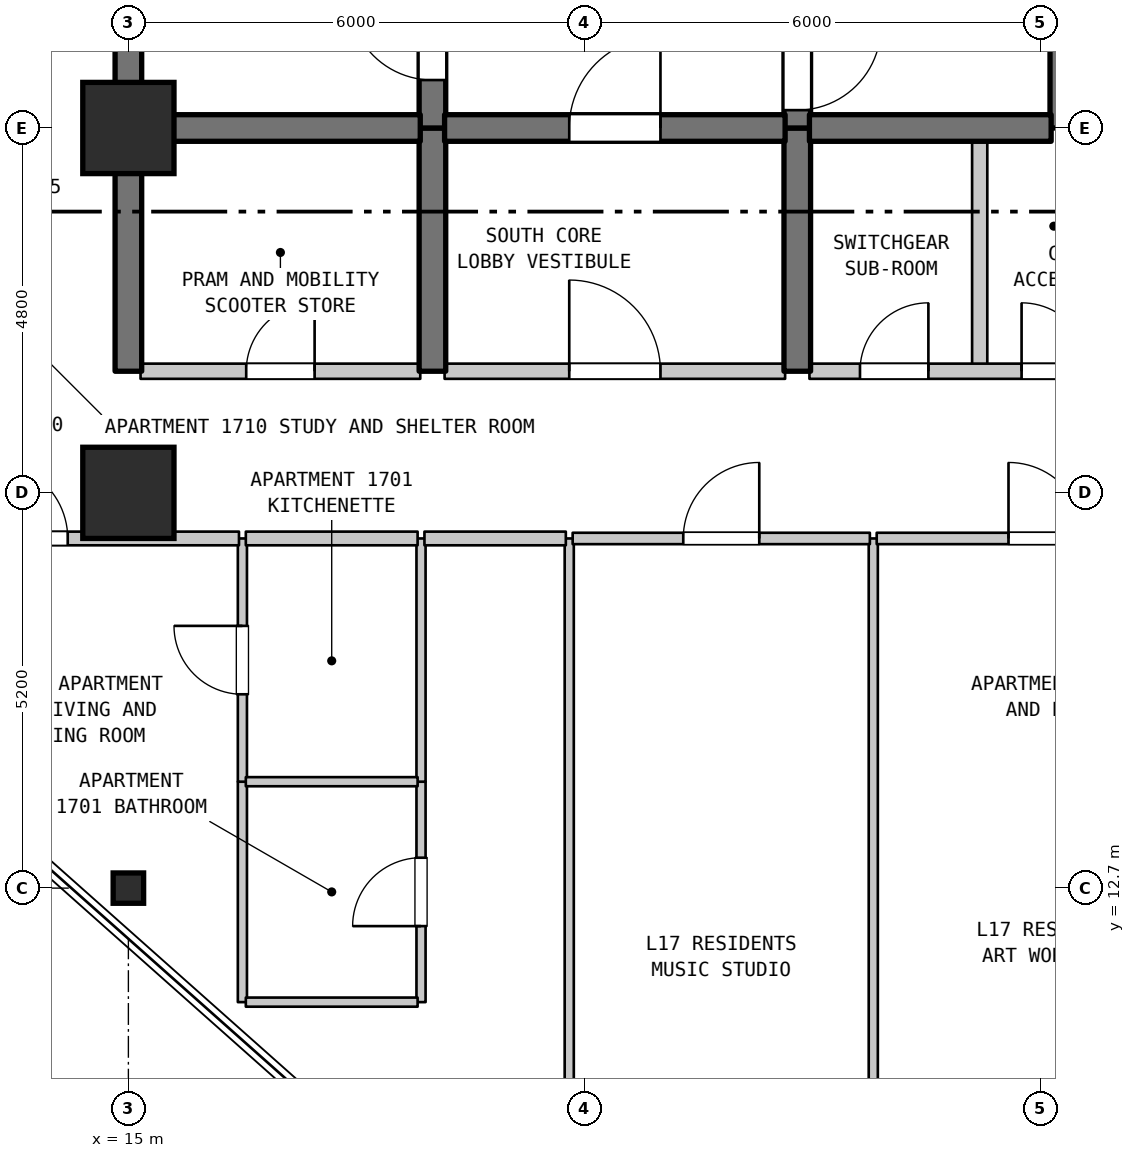
"""IFC4 building model, lengths in metres.
Left out: names, types, materials, properties, quantities, classifications, styles, units other than length and angle.
Written with IfcOpenShell. Run it as: python <this file> out.ifc"""

import sys

from ifc_helpers import new_model, si_unit, direction, frame, frame_2d, origin, origin_2d, place, context, subcontext, project, spatial, rectangle, i_section, extrude, element, fill, save


model = new_model("IFC4")
c1 = context("Model", 3, precision=1e-05, world=origin(), true_north=direction((0.0, 1.0)))
c2 = subcontext(c1, "Body", "Model", "MODEL_VIEW")
j1 = project(units=[si_unit("LENGTHUNIT", "METRE"), si_unit("PLANEANGLEUNIT", "RADIAN")], contexts=[c1])
p1 = place(None, origin())
s1 = spatial("IfcSite", under=j1, at=p1, CompositionType="ELEMENT")
p2 = place(p1, origin())
s2 = spatial("IfcBuilding", under=s1, at=p2, CompositionType="ELEMENT")
p3 = place(p2, frame((0.0, 0.0, 73.8)))
s3 = spatial("IfcBuildingStorey", under=s2, at=p3, CompositionType="ELEMENT", Elevation=73.8)
p4 = place(p3, frame((15.0, 12.7, 0.0), z_axis=(0.0, 0.0, 1.0), x_axis=(1.0, 0.0, 0.0)))
e1 = element("IfcColumn", 1, at=p4, inside=s3, PredefinedType="COLUMN", context=c2, shape_type="SweptSolid", body=[
    extrude(i_section(OverallWidth=0.401, OverallDepth=0.399, WebThickness=0.025, FlangeThickness=0.04, FilletRadius=0.015, at=origin_2d()), origin(), (0.0, 0.0, 1.0), 3.7),
])
for number, where, z_axis, x_axis in (
    (2, (15.0, 17.9, 0.0), (0.0, 0.0, 1.0), (1.0, 0.0, 0.0)),
    (3, (15.0, 22.7, 0.0), (0.0, 0.0, 1.0), (1.0, 0.0, 0.0)),
):
    element("IfcColumn", number, at=place(p3, frame(where, z_axis=z_axis, x_axis=x_axis)), inside=s3, PredefinedType="COLUMN", context=c2, shape_type="SweptSolid", body=[
        extrude(rectangle(XDim=1.2, YDim=1.2, at=origin_2d()), origin(), (0.0, 0.0, 1.0), 3.7),
    ])
p5 = place(p3, frame((15.0, 19.5, 0.0), z_axis=(0.0, 0.0, 1.0), x_axis=(0.0, 1.0, 0.0)))
e4 = element("IfcWall", 4, at=p5, inside=s3, PredefinedType="SHEAR", context=c2, shape_type="SweptSolid", body=[
    extrude(rectangle(XDim=3.2, YDim=0.35, at=frame_2d((1.6, 0.0))), origin(), (0.0, 0.0, 1.0), 3.385),
])
p6 = place(p3, frame((15.0, 22.7, 0.0), z_axis=(0.0, 0.0, 1.0), x_axis=(0.0, 1.0, 0.0)))
e5 = element("IfcWall", 5, at=p6, inside=s3, PredefinedType="SHEAR", context=c2, shape_type="SweptSolid", body=[
    extrude(rectangle(XDim=6.8, YDim=0.35, at=frame_2d((3.4, 0.0))), origin(), (0.0, 0.0, 1.0), 3.385),
])
p7 = place(p3, frame((16.5, 11.2, 0.0), z_axis=(0.0, 0.0, 1.0), x_axis=(0.0, 1.0, 0.0)))
e6 = element("IfcWall", 6, at=p7, inside=s3, PredefinedType="PARTITIONING", context=c2, shape_type="SweptSolid", body=[
    extrude(rectangle(XDim=2.9, YDim=0.12, at=frame_2d((1.45, 0.0))), origin(), (0.0, 0.0, 1.0), 3.385),
])
p8 = place(p3, frame((16.5, 14.1, 0.0), z_axis=(0.0, 0.0, 1.0), x_axis=(0.0, 1.0, 0.0)))
e7 = element("IfcWall", 7, at=p8, inside=s3, PredefinedType="PARTITIONING", context=c2, shape_type="SweptSolid", body=[
    extrude(rectangle(XDim=3.2, YDim=0.12, at=frame_2d((1.6, 0.0))), origin(), (0.0, 0.0, 1.0), 3.385),
])
p9 = place(p8, frame((1.15, 0.0, 0.0)))
e8 = element("IfcOpeningElement", 8, at=p9, cuts=e7, PredefinedType="OPENING", context=c2, shape_type="SweptSolid", body=[
    extrude(rectangle(XDim=0.9, YDim=2.15, at=frame_2d((0.45, 1.075))), frame((0.0, 0.07, 0.0), z_axis=(0.0, -1.0, 0.0), x_axis=(1.0, 0.0, 0.0)), (0.0, 0.0, 1.0), 0.14),
])
p10 = place(p3, frame((18.85, 11.2, 0.0), z_axis=(0.0, 0.0, 1.0), x_axis=(0.0, 1.0, 0.0)))
e9 = element("IfcWall", 9, at=p10, inside=s3, PredefinedType="PARTITIONING", context=c2, shape_type="SweptSolid", body=[
    extrude(rectangle(XDim=2.9, YDim=0.12, at=frame_2d((1.45, 0.0))), origin(), (0.0, 0.0, 1.0), 3.385),
])
p11 = place(p10, frame((1.0, 0.0, 0.0)))
e10 = element("IfcOpeningElement", 10, at=p11, cuts=e9, PredefinedType="OPENING", context=c2, shape_type="SweptSolid", body=[
    extrude(rectangle(XDim=0.9, YDim=2.1, at=frame_2d((0.45, 1.05))), frame((0.0, 0.07, 0.0), z_axis=(0.0, -1.0, 0.0), x_axis=(1.0, 0.0, 0.0)), (0.0, 0.0, 1.0), 0.14),
])
p12 = place(p3, frame((18.85, 14.1, 0.0), z_axis=(0.0, 0.0, 1.0), x_axis=(0.0, 1.0, 0.0)))
e11 = element("IfcWall", 11, at=p12, inside=s3, PredefinedType="PARTITIONING", context=c2, shape_type="SweptSolid", body=[
    extrude(rectangle(XDim=3.2, YDim=0.12, at=frame_2d((1.6, 0.0))), origin(), (0.0, 0.0, 1.0), 3.385),
])
p13 = place(p3, frame((19.0, 19.5, 0.0), z_axis=(0.0, 0.0, 1.0), x_axis=(0.0, 1.0, 0.0)))
e12 = element("IfcWall", 12, at=p13, inside=s3, PredefinedType="SHEAR", context=c2, shape_type="SweptSolid", body=[
    extrude(rectangle(XDim=3.2, YDim=0.35, at=frame_2d((1.6, 0.0))), origin(), (0.0, 0.0, 1.0), 3.385),
])
p14 = place(p3, frame((19.0, 22.7, 0.0), z_axis=(0.0, 0.0, 1.0), x_axis=(0.0, 1.0, 0.0)))
e13 = element("IfcWall", 13, at=p14, inside=s3, PredefinedType="SHEAR", context=c2, shape_type="SweptSolid", body=[
    extrude(rectangle(XDim=5.5, YDim=0.35, at=frame_2d((2.75, 0.0))), origin(), (0.0, 0.0, 1.0), 3.385),
])
p15 = place(p14, frame((0.631, 0.0, 0.0)))
e14 = element("IfcOpeningElement", 14, at=p15, cuts=e13, PredefinedType="OPENING", context=c2, shape_type="SweptSolid", body=[
    extrude(rectangle(XDim=1.1, YDim=2.15, at=frame_2d((0.55, 1.075))), frame((0.0, 0.185, 0.0), z_axis=(0.0, -1.0, 0.0), x_axis=(1.0, 0.0, 0.0)), (0.0, 0.0, 1.0), 0.37),
])
p16 = place(p3, frame((20.8, 6.888, 0.0), z_axis=(0.0, 0.0, 1.0), x_axis=(0.0, 1.0, 0.0)))
e15 = element("IfcWall", 15, at=p16, inside=s3, PredefinedType="PARTITIONING", context=c2, shape_type="SweptSolid", body=[
    extrude(rectangle(XDim=10.412, YDim=0.12, at=frame_2d((5.206, 0.0))), origin(), (0.0, 0.0, 1.0), 3.385),
])
p17 = place(p3, frame((23.8, 19.5, 0.0), z_axis=(0.0, 0.0, 1.0), x_axis=(0.0, 1.0, 0.0)))
e16 = element("IfcWall", 16, at=p17, inside=s3, PredefinedType="SHEAR", context=c2, shape_type="SweptSolid", body=[
    extrude(rectangle(XDim=3.2, YDim=0.35, at=frame_2d((1.6, 0.0))), origin(), (0.0, 0.0, 1.0), 3.385),
])
p18 = place(p3, frame((23.8, 22.7, 0.0), z_axis=(0.0, 0.0, 1.0), x_axis=(0.0, 1.0, 0.0)))
e17 = element("IfcWall", 17, at=p18, inside=s3, PredefinedType="SHEAR", context=c2, shape_type="SweptSolid", body=[
    extrude(rectangle(XDim=5.5, YDim=0.35, at=frame_2d((2.75, 0.0))), origin(), (0.0, 0.0, 1.0), 3.385),
])
p19 = place(p18, frame((0.235, 0.0, 0.0)))
e18 = element("IfcOpeningElement", 18, at=p19, cuts=e17, PredefinedType="OPENING", context=c2, shape_type="SweptSolid", body=[
    extrude(rectangle(XDim=1.1, YDim=2.15, at=frame_2d((0.55, 1.075))), frame((0.0, 0.185, 0.0), z_axis=(0.0, -1.0, 0.0), x_axis=(1.0, 0.0, 0.0)), (0.0, 0.0, 1.0), 0.37),
])
p20 = place(p3, frame((24.8, 0.71, 0.0), z_axis=(0.0, 0.0, 1.0), x_axis=(0.0, 1.0, 0.0)))
e19 = element("IfcWall", 19, at=p20, inside=s3, PredefinedType="PARTITIONING", context=c2, shape_type="SweptSolid", body=[
    extrude(rectangle(XDim=16.59, YDim=0.12, at=frame_2d((8.295, 0.0))), origin(), (0.0, 0.0, 1.0), 3.385),
])
p21 = place(p3, frame((26.2, 19.5, 0.0), z_axis=(0.0, 0.0, 1.0), x_axis=(0.0, 1.0, 0.0)))
e20 = element("IfcWall", 20, at=p21, inside=s3, PredefinedType="STANDARD", context=c2, shape_type="SweptSolid", body=[
    extrude(rectangle(XDim=3.2, YDim=0.2, at=frame_2d((1.6, 0.0))), origin(), (0.0, 0.0, 1.0), 3.385),
])
p22 = place(p3, frame((27.3, 22.7, 0.0), z_axis=(0.0, 0.0, 1.0), x_axis=(0.0, 1.0, 0.0)))
e21 = element("IfcWall", 21, at=p22, inside=s3, PredefinedType="SHEAR", context=c2, shape_type="SweptSolid", body=[
    extrude(rectangle(XDim=2.9, YDim=0.35, at=frame_2d((1.45, 0.0))), origin(), (0.0, 0.0, 1.0), 3.385),
])
for number, where, z_axis, x_axis in (
    (22, (16.545, 11.2, 0.0), (0.0, 0.0, 1.0), (1.0, 0.0, 0.0)),
    (23, (16.545, 14.1, 0.0), (0.0, 0.0, 1.0), (1.0, 0.0, 0.0)),
):
    element("IfcWall", number, at=place(p3, frame(where, z_axis=z_axis, x_axis=x_axis)), inside=s3, PredefinedType="PARTITIONING", context=c2, shape_type="SweptSolid", body=[
        extrude(rectangle(XDim=2.26, YDim=0.12, at=frame_2d((1.13, 0.0))), origin(), (0.0, 0.0, 1.0), 3.385),
    ])
p23 = place(p3, frame((12.875, 17.3, 0.0), z_axis=(0.0, 0.0, 1.0), x_axis=(1.0, 0.0, 0.0)))
e24 = element("IfcWall", 24, at=p23, inside=s3, PredefinedType="STANDARD", context=c2, shape_type="SweptSolid", body=[
    extrude(rectangle(XDim=3.58, YDim=0.18, at=frame_2d((1.79, 0.0))), origin(), (0.0, 0.0, 1.0), 3.385),
])
p24 = place(p23, frame((0.327, 0.0, 0.0)))
e25 = element("IfcOpeningElement", 25, at=p24, cuts=e24, PredefinedType="OPENING", context=c2, shape_type="SweptSolid", body=[
    extrude(rectangle(XDim=1.0, YDim=2.15, at=frame_2d((0.5, 1.075))), frame((0.0, 0.1, 0.0), z_axis=(0.0, -1.0, 0.0), x_axis=(1.0, 0.0, 0.0)), (0.0, 0.0, 1.0), 0.2),
])
p25 = place(p3, frame((16.545, 17.3, 0.0), z_axis=(0.0, 0.0, 1.0), x_axis=(1.0, 0.0, 0.0)))
e26 = element("IfcWall", 26, at=p25, inside=s3, PredefinedType="STANDARD", context=c2, shape_type="SweptSolid", body=[
    extrude(rectangle(XDim=2.26, YDim=0.18, at=frame_2d((1.13, 0.0))), origin(), (0.0, 0.0, 1.0), 3.385),
])
p26 = place(p3, frame((18.895, 17.3, 0.0), z_axis=(0.0, 0.0, 1.0), x_axis=(1.0, 0.0, 0.0)))
e27 = element("IfcWall", 27, at=p26, inside=s3, PredefinedType="STANDARD", context=c2, shape_type="SweptSolid", body=[
    extrude(rectangle(XDim=1.86, YDim=0.18, at=frame_2d((0.93, 0.0))), origin(), (0.0, 0.0, 1.0), 3.385),
])
p27 = place(p3, frame((20.845, 17.3, 0.0), z_axis=(0.0, 0.0, 1.0), x_axis=(1.0, 0.0, 0.0)))
e28 = element("IfcWall", 28, at=p27, inside=s3, PredefinedType="STANDARD", context=c2, shape_type="SweptSolid", body=[
    extrude(rectangle(XDim=3.91, YDim=0.15, at=frame_2d((1.955, 0.0))), origin(), (0.0, 0.0, 1.0), 3.385),
])
p28 = place(p27, frame((1.455, 0.0, 0.0)))
e29 = element("IfcOpeningElement", 29, at=p28, cuts=e28, PredefinedType="OPENING", context=c2, shape_type="SweptSolid", body=[
    extrude(rectangle(XDim=1.0, YDim=2.15, at=frame_2d((0.5, 1.075))), frame((0.0, 0.085, 0.0), z_axis=(0.0, -1.0, 0.0), x_axis=(1.0, 0.0, 0.0)), (0.0, 0.0, 1.0), 0.17),
])
p29 = place(p3, frame((24.845, 17.3, 0.0), z_axis=(0.0, 0.0, 1.0), x_axis=(1.0, 0.0, 0.0)))
e30 = element("IfcWall", 30, at=p29, inside=s3, PredefinedType="STANDARD", context=c2, shape_type="SweptSolid", body=[
    extrude(rectangle(XDim=4.61, YDim=0.15, at=frame_2d((2.305, 0.0))), origin(), (0.0, 0.0, 1.0), 3.385),
])
p30 = place(p29, frame((1.734, 0.0, 0.0)))
e31 = element("IfcOpeningElement", 31, at=p30, cuts=e30, PredefinedType="OPENING", context=c2, shape_type="SweptSolid", body=[
    extrude(rectangle(XDim=1.0, YDim=2.15, at=frame_2d((0.5, 1.075))), frame((0.0, 0.085, 0.0), z_axis=(0.0, -1.0, 0.0), x_axis=(1.0, 0.0, 0.0)), (0.0, 0.0, 1.0), 0.17),
])
p31 = place(p3, frame((15.16, 19.5, 0.0), z_axis=(0.0, 0.0, 1.0), x_axis=(1.0, 0.0, 0.0)))
e32 = element("IfcWall", 32, at=p31, inside=s3, PredefinedType="STANDARD", context=c2, shape_type="SweptSolid", body=[
    extrude(rectangle(XDim=3.68, YDim=0.2, at=frame_2d((1.84, 0.0))), origin(), (0.0, 0.0, 1.0), 3.385),
])
p32 = place(p31, frame((1.39, 0.0, 0.0)))
e33 = element("IfcOpeningElement", 33, at=p32, cuts=e32, PredefinedType="OPENING", context=c2, shape_type="SweptSolid", body=[
    extrude(rectangle(XDim=0.9, YDim=2.15, at=frame_2d((0.45, 1.075))), frame((0.0, 0.11, 0.0), z_axis=(0.0, -1.0, 0.0), x_axis=(1.0, 0.0, 0.0)), (0.0, 0.0, 1.0), 0.22),
])
p33 = place(p3, frame((19.16, 19.5, 0.0), z_axis=(0.0, 0.0, 1.0), x_axis=(1.0, 0.0, 0.0)))
e34 = element("IfcWall", 34, at=p33, inside=s3, PredefinedType="STANDARD", context=c2, shape_type="SweptSolid", body=[
    extrude(rectangle(XDim=4.48, YDim=0.2, at=frame_2d((2.24, 0.0))), origin(), (0.0, 0.0, 1.0), 3.385),
])
p34 = place(p33, frame((1.64, 0.0, 0.0)))
e35 = element("IfcOpeningElement", 35, at=p34, cuts=e34, PredefinedType="OPENING", context=c2, shape_type="SweptSolid", body=[
    extrude(rectangle(XDim=1.2, YDim=2.2, at=frame_2d((0.6, 1.1))), frame((0.0, 0.11, 0.0), z_axis=(0.0, -1.0, 0.0), x_axis=(1.0, 0.0, 0.0)), (0.0, 0.0, 1.0), 0.22),
])
p35 = place(p3, frame((23.96, 19.5, 0.0), z_axis=(0.0, 0.0, 1.0), x_axis=(1.0, 0.0, 0.0)))
e36 = element("IfcWall", 36, at=p35, inside=s3, PredefinedType="STANDARD", context=c2, shape_type="SweptSolid", body=[
    extrude(rectangle(XDim=4.455, YDim=0.2, at=frame_2d((2.228, 0.0))), origin(), (0.0, 0.0, 1.0), 3.385),
])
p36 = place(p35, frame((0.665, 0.0, 0.0)))
e37 = element("IfcOpeningElement", 37, at=p36, cuts=e36, PredefinedType="OPENING", context=c2, shape_type="SweptSolid", body=[
    extrude(rectangle(XDim=0.9, YDim=2.15, at=frame_2d((0.45, 1.075))), frame((0.0, 0.11, 0.0), z_axis=(0.0, -1.0, 0.0), x_axis=(1.0, 0.0, 0.0)), (0.0, 0.0, 1.0), 0.22),
])
p37 = place(p35, frame((2.791, 0.0, 0.0)))
e38 = element("IfcOpeningElement", 38, at=p37, cuts=e36, PredefinedType="OPENING", context=c2, shape_type="SweptSolid", body=[
    extrude(rectangle(XDim=0.9, YDim=2.15, at=frame_2d((0.45, 1.075))), frame((0.0, 0.11, 0.0), z_axis=(0.0, -1.0, 0.0), x_axis=(1.0, 0.0, 0.0)), (0.0, 0.0, 1.0), 0.22),
])
p38 = place(p3, frame((15.16, 22.7, 0.0), z_axis=(0.0, 0.0, 1.0), x_axis=(1.0, 0.0, 0.0)))
e39 = element("IfcWall", 39, at=p38, inside=s3, PredefinedType="SHEAR", context=c2, shape_type="SweptSolid", body=[
    extrude(rectangle(XDim=3.68, YDim=0.35, at=frame_2d((1.84, 0.0))), origin(), (0.0, 0.0, 1.0), 3.385),
])
p39 = place(p3, frame((19.16, 22.7, 0.0), z_axis=(0.0, 0.0, 1.0), x_axis=(1.0, 0.0, 0.0)))
e40 = element("IfcWall", 40, at=p39, inside=s3, PredefinedType="SHEAR", context=c2, shape_type="SweptSolid", body=[
    extrude(rectangle(XDim=4.48, YDim=0.35, at=frame_2d((2.24, 0.0))), origin(), (0.0, 0.0, 1.0), 3.385),
])
p40 = place(p39, frame((1.64, 0.0, 0.0)))
e41 = element("IfcOpeningElement", 41, at=p40, cuts=e40, PredefinedType="OPENING", context=c2, shape_type="SweptSolid", body=[
    extrude(rectangle(XDim=1.2, YDim=2.2, at=frame_2d((0.6, 1.1))), frame((0.0, 0.185, 0.0), z_axis=(0.0, -1.0, 0.0), x_axis=(1.0, 0.0, 0.0)), (0.0, 0.0, 1.0), 0.37),
])
p41 = place(p3, frame((23.96, 22.7, 0.0), z_axis=(0.0, 0.0, 1.0), x_axis=(1.0, 0.0, 0.0)))
e42 = element("IfcWall", 42, at=p41, inside=s3, PredefinedType="SHEAR", context=c2, shape_type="SweptSolid", body=[
    extrude(rectangle(XDim=3.18, YDim=0.35, at=frame_2d((1.59, 0.0))), origin(), (0.0, 0.0, 1.0), 3.385),
])
p42 = place(p9, origin())
e43 = element("IfcDoor", 43, at=p42, inside=s3, OperationType="SINGLE_SWING_RIGHT", PredefinedType="DOOR", context=c2, shape_type="SweptSolid", body=[
    extrude(rectangle(XDim=0.9, YDim=2.15, at=frame_2d((0.45, 1.075))), frame((0.0, 0.025, 0.0), z_axis=(0.0, -1.0, 0.0), x_axis=(1.0, 0.0, 0.0)), (0.0, 0.0, 1.0), 0.05),
])
fill(e8, e43)
p43 = place(p11, origin())
e44 = element("IfcDoor", 44, at=p43, inside=s3, OperationType="SINGLE_SWING_LEFT", PredefinedType="DOOR", context=c2, shape_type="SweptSolid", body=[
    extrude(rectangle(XDim=0.9, YDim=2.1, at=frame_2d((0.45, 1.05))), frame((0.0, 0.025, 0.0), z_axis=(0.0, -1.0, 0.0), x_axis=(1.0, 0.0, 0.0)), (0.0, 0.0, 1.0), 0.05),
])
fill(e10, e44)
p44 = place(p15, origin())
e45 = element("IfcDoor", 45, at=p44, inside=s3, OperationType="SINGLE_SWING_RIGHT", PredefinedType="DOOR", context=c2, shape_type="SweptSolid", body=[
    extrude(rectangle(XDim=1.1, YDim=2.15, at=frame_2d((0.55, 1.075))), frame((0.0, 0.025, 0.0), z_axis=(0.0, -1.0, 0.0), x_axis=(1.0, 0.0, 0.0)), (0.0, 0.0, 1.0), 0.05),
])
fill(e14, e45)
p45 = place(p19, frame((1.1, 0.0, 0.0), z_axis=(0.0, 0.0, 1.0), x_axis=(-1.0, 0.0, 0.0)))
e46 = element("IfcDoor", 46, at=p45, inside=s3, OperationType="SINGLE_SWING_RIGHT", PredefinedType="DOOR", context=c2, shape_type="SweptSolid", body=[
    extrude(rectangle(XDim=1.1, YDim=2.15, at=frame_2d((0.55, 1.075))), frame((0.0, 0.025, 0.0), z_axis=(0.0, -1.0, 0.0), x_axis=(1.0, 0.0, 0.0)), (0.0, 0.0, 1.0), 0.05),
])
fill(e18, e46)
p46 = place(p24, origin())
e47 = element("IfcDoor", 47, at=p46, inside=s3, OperationType="SINGLE_SWING_LEFT", PredefinedType="DOOR", context=c2, shape_type="SweptSolid", body=[
    extrude(rectangle(XDim=1.0, YDim=2.15, at=frame_2d((0.5, 1.075))), frame((0.0, 0.025, 0.0), z_axis=(0.0, -1.0, 0.0), x_axis=(1.0, 0.0, 0.0)), (0.0, 0.0, 1.0), 0.05),
])
fill(e25, e47)
p47 = place(p28, origin())
e48 = element("IfcDoor", 48, at=p47, inside=s3, OperationType="SINGLE_SWING_RIGHT", PredefinedType="DOOR", context=c2, shape_type="SweptSolid", body=[
    extrude(rectangle(XDim=1.0, YDim=2.15, at=frame_2d((0.5, 1.075))), frame((0.0, 0.025, 0.0), z_axis=(0.0, -1.0, 0.0), x_axis=(1.0, 0.0, 0.0)), (0.0, 0.0, 1.0), 0.05),
])
fill(e29, e48)
p48 = place(p30, origin())
e49 = element("IfcDoor", 49, at=p48, inside=s3, OperationType="SINGLE_SWING_LEFT", PredefinedType="DOOR", context=c2, shape_type="SweptSolid", body=[
    extrude(rectangle(XDim=1.0, YDim=2.15, at=frame_2d((0.5, 1.075))), frame((0.0, 0.025, 0.0), z_axis=(0.0, -1.0, 0.0), x_axis=(1.0, 0.0, 0.0)), (0.0, 0.0, 1.0), 0.05),
])
fill(e31, e49)
p49 = place(p32, origin())
e50 = element("IfcDoor", 50, at=p49, inside=s3, OperationType="SINGLE_SWING_RIGHT", PredefinedType="DOOR", context=c2, shape_type="SweptSolid", body=[
    extrude(rectangle(XDim=0.9, YDim=2.15, at=frame_2d((0.45, 1.075))), frame((0.0, 0.025, 0.0), z_axis=(0.0, -1.0, 0.0), x_axis=(1.0, 0.0, 0.0)), (0.0, 0.0, 1.0), 0.05),
])
fill(e33, e50)
p50 = place(p34, origin())
e51 = element("IfcDoor", 51, at=p50, inside=s3, OperationType="SINGLE_SWING_LEFT", PredefinedType="DOOR", context=c2, shape_type="SweptSolid", body=[
    extrude(rectangle(XDim=1.2, YDim=2.2, at=frame_2d((0.6, 1.1))), frame((0.0, 0.025, 0.0), z_axis=(0.0, -1.0, 0.0), x_axis=(1.0, 0.0, 0.0)), (0.0, 0.0, 1.0), 0.05),
])
fill(e35, e51)
p51 = place(p36, origin())
e52 = element("IfcDoor", 52, at=p51, inside=s3, OperationType="SINGLE_SWING_RIGHT", PredefinedType="DOOR", context=c2, shape_type="SweptSolid", body=[
    extrude(rectangle(XDim=0.9, YDim=2.15, at=frame_2d((0.45, 1.075))), frame((0.0, 0.025, 0.0), z_axis=(0.0, -1.0, 0.0), x_axis=(1.0, 0.0, 0.0)), (0.0, 0.0, 1.0), 0.05),
])
fill(e37, e52)
p52 = place(p37, origin())
e53 = element("IfcDoor", 53, at=p52, inside=s3, OperationType="SINGLE_SWING_LEFT", PredefinedType="DOOR", context=c2, shape_type="SweptSolid", body=[
    extrude(rectangle(XDim=0.9, YDim=2.15, at=frame_2d((0.45, 1.075))), frame((0.0, 0.025, 0.0), z_axis=(0.0, -1.0, 0.0), x_axis=(1.0, 0.0, 0.0)), (0.0, 0.0, 1.0), 0.05),
])
fill(e38, e53)
p53 = place(p40, origin())
e54 = element("IfcDoor", 54, at=p53, inside=s3, OperationType="SINGLE_SWING_RIGHT", PredefinedType="DOOR", context=c2, shape_type="SweptSolid", body=[
    extrude(rectangle(XDim=1.2, YDim=2.2, at=frame_2d((0.6, 1.1))), frame((0.0, 0.025, 0.0), z_axis=(0.0, -1.0, 0.0), x_axis=(1.0, 0.0, 0.0)), (0.0, 0.0, 1.0), 0.05),
])
fill(e41, e54)
save(model, sys.argv[1])
